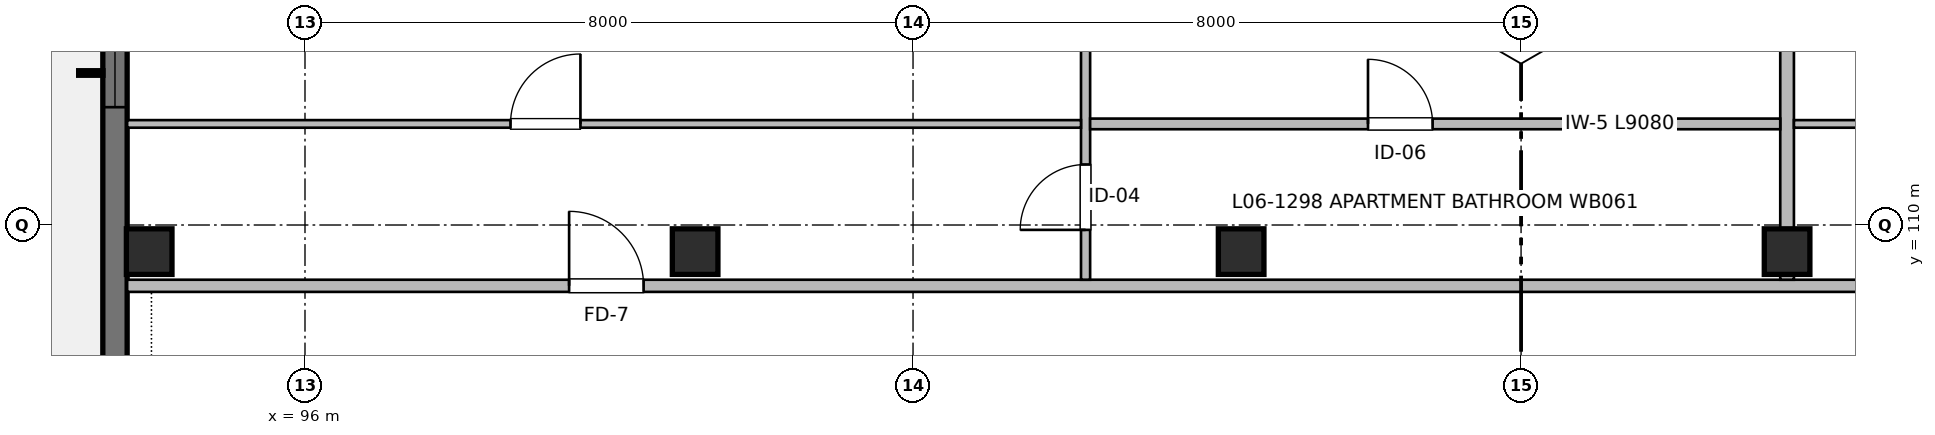
"""IFC4 building model, lengths in metres.
Left out: names, types, materials, properties, quantities, classifications, styles, units other than length and angle.
Written with IfcOpenShell. Run it as: python <this file> out.ifc"""

import sys

from ifc_helpers import new_model, si_unit, direction, frame, frame_2d, origin, origin_2d, place, context, subcontext, project, spatial, rectangle, extrude, element, fill, save


model = new_model("IFC4")
c1 = context("Model", 3, precision=1e-05, world=origin(), true_north=direction((0.0, 1.0)))
c2 = subcontext(c1, "Body", "Model", "MODEL_VIEW")
j1 = project(units=[si_unit("LENGTHUNIT", "METRE"), si_unit("PLANEANGLEUNIT", "RADIAN")], contexts=[c1])
p1 = place(None, origin())
s1 = spatial("IfcSite", under=j1, at=p1, CompositionType="ELEMENT")
p2 = place(p1, origin())
s2 = spatial("IfcBuilding", under=s1, at=p2, CompositionType="ELEMENT")
p3 = place(p2, frame((0.0, 0.0, 20.16)))
s3 = spatial("IfcBuildingStorey", under=s2, at=p3, CompositionType="ELEMENT", Elevation=20.16)
for number, where, z_axis, x_axis in (
    (1, (93.95, 109.65, 0.0), (0.0, 0.0, 1.0), (1.0, 0.0, 0.0)),
    (2, (101.133, 109.65, 0.0), (0.0, 0.0, 1.0), (1.0, 0.0, 0.0)),
    (3, (108.317, 109.65, 0.0), (0.0, 0.0, 1.0), (1.0, 0.0, 0.0)),
    (4, (115.5, 109.65, 0.0), (0.0, 0.0, 1.0), (1.0, 0.0, 0.0)),
):
    element("IfcColumn", number, at=place(p3, frame(where, z_axis=z_axis, x_axis=x_axis)), inside=s3, PredefinedType="COLUMN", context=c2, shape_type="SweptSolid", body=[
        extrude(rectangle(XDim=0.6, YDim=0.6, at=origin_2d()), origin(), (0.0, 0.0, 1.0), 3.2),
    ])
p4 = place(p3, frame((93.5, 100.0, 0.0), z_axis=(0.0, 0.0, 1.0), x_axis=(0.0, 1.0, 0.0)))
e5 = element("IfcWall", 5, at=p4, inside=s3, PredefinedType="SHEAR", context=c2, shape_type="SweptSolid", body=[
    extrude(rectangle(XDim=16.0, YDim=0.32, at=frame_2d((8.0, 0.0))), origin(), (0.0, 0.0, 1.0), 2.98),
])
p5 = place(p4, frame((3.4, 0.0, 0.0)))
e6 = element("IfcOpeningElement", 6, at=p5, cuts=e5, PredefinedType="OPENING", context=c2, shape_type="SweptSolid", body=[
    extrude(rectangle(XDim=1.2, YDim=2.2, at=frame_2d((0.6, 1.1))), frame((0.0, 0.17, 0.0), z_axis=(0.0, -1.0, 0.0), x_axis=(1.0, 0.0, 0.0)), (0.0, 0.0, 1.0), 0.34),
])
p6 = place(p4, frame((5.3, 0.0, 0.82)))
e7 = element("IfcOpeningElement", 7, at=p6, cuts=e5, PredefinedType="OPENING", context=c2, shape_type="SweptSolid", body=[
    extrude(rectangle(XDim=1.3, YDim=1.4, at=frame_2d((0.65, 0.7))), frame((0.0, 0.17, 0.0), z_axis=(0.0, -1.0, 0.0), x_axis=(1.0, 0.0, 0.0)), (0.0, 0.0, 1.0), 0.34),
])
p7 = place(p4, frame((11.55, 0.0, 0.72)))
e8 = element("IfcOpeningElement", 8, at=p7, cuts=e5, PredefinedType="OPENING", context=c2, shape_type="SweptSolid", body=[
    extrude(rectangle(XDim=1.8, YDim=1.5, at=frame_2d((0.9, 0.75))), frame((0.0, 0.17, 0.0), z_axis=(0.0, -1.0, 0.0), x_axis=(1.0, 0.0, 0.0)), (0.0, 0.0, 1.0), 0.34),
])
p8 = place(p3, frame((93.66, 109.2, 0.0), z_axis=(0.0, 0.0, 1.0), x_axis=(1.0, 0.0, 0.0)))
e9 = element("IfcWall", 9, at=p8, inside=s3, PredefinedType="PARTITIONING", context=c2, shape_type="SweptSolid", body=[
    extrude(rectangle(XDim=43.68, YDim=0.16, at=frame_2d((21.84, 0.0))), origin(), (0.0, 0.0, 1.0), 2.935),
])
p9 = place(p8, frame((5.815, 0.0, 0.0)))
e10 = element("IfcOpeningElement", 10, at=p9, cuts=e9, PredefinedType="OPENING", context=c2, shape_type="SweptSolid", body=[
    extrude(rectangle(XDim=0.98, YDim=2.15, at=frame_2d((0.49, 1.075))), frame((0.0, 0.09, 0.0), z_axis=(0.0, -1.0, 0.0), x_axis=(1.0, 0.0, 0.0)), (0.0, 0.0, 1.0), 0.18),
])
p10 = place(p8, frame((27.35, 0.0, 0.0)))
e11 = element("IfcOpeningElement", 11, at=p10, cuts=e9, PredefinedType="OPENING", context=c2, shape_type="SweptSolid", body=[
    extrude(rectangle(XDim=0.98, YDim=2.15, at=frame_2d((0.49, 1.075))), frame((0.0, 0.09, 0.0), z_axis=(0.0, -1.0, 0.0), x_axis=(1.0, 0.0, 0.0)), (0.0, 0.0, 1.0), 0.18),
])
p11 = place(p3, frame((115.5, 109.28, 0.0), z_axis=(0.0, 0.0, 1.0), x_axis=(0.0, 1.0, 0.0)))
e12 = element("IfcWall", 12, at=p11, inside=s3, PredefinedType="PARTITIONING", context=c2, shape_type="SweptSolid", body=[
    extrude(rectangle(XDim=6.59, YDim=0.18, at=frame_2d((3.295, 0.0))), origin(), (0.0, 0.0, 1.0), 2.68),
])
p12 = place(p3, frame((106.27, 109.28, 0.0), z_axis=(0.0, 0.0, 1.0), x_axis=(0.0, 1.0, 0.0)))
e13 = element("IfcWall", 13, at=p12, inside=s3, PredefinedType="PARTITIONING", context=c2, shape_type="SweptSolid", body=[
    extrude(rectangle(XDim=6.59, YDim=0.12, at=frame_2d((3.295, 0.0))), origin(), (0.0, 0.0, 1.0), 2.935),
])
p13 = place(p12, frame((0.656, 0.0, 0.0)))
e14 = element("IfcOpeningElement", 14, at=p13, cuts=e13, PredefinedType="OPENING", context=c2, shape_type="SweptSolid", body=[
    extrude(rectangle(XDim=0.86, YDim=2.1, at=frame_2d((0.43, 1.05))), frame((0.0, 0.07, 0.0), z_axis=(0.0, -1.0, 0.0), x_axis=(1.0, 0.0, 0.0)), (0.0, 0.0, 1.0), 0.14),
])
p14 = place(p12, frame((4.093, 0.0, 0.0)))
e15 = element("IfcOpeningElement", 15, at=p14, cuts=e13, PredefinedType="OPENING", context=c2, shape_type="SweptSolid", body=[
    extrude(rectangle(XDim=0.9, YDim=2.1, at=frame_2d((0.45, 1.05))), frame((0.0, 0.07, 0.0), z_axis=(0.0, -1.0, 0.0), x_axis=(1.0, 0.0, 0.0)), (0.0, 0.0, 1.0), 0.14),
])
p15 = place(p3, frame((106.33, 111.33, 0.0), z_axis=(0.0, 0.0, 1.0), x_axis=(1.0, 0.0, 0.0)))
e16 = element("IfcWall", 16, at=p15, inside=s3, PredefinedType="PARTITIONING", context=c2, shape_type="SweptSolid", body=[
    extrude(rectangle(XDim=9.08, YDim=0.14, at=frame_2d((4.54, 0.0))), origin(), (0.0, 0.0, 1.0), 2.935),
])
p16 = place(p15, frame((3.656, 0.0, 0.0)))
e17 = element("IfcOpeningElement", 17, at=p16, cuts=e16, PredefinedType="OPENING", context=c2, shape_type="SweptSolid", body=[
    extrude(rectangle(XDim=0.85, YDim=2.05, at=frame_2d((0.425, 1.025))), frame((0.0, 0.08, 0.0), z_axis=(0.0, -1.0, 0.0), x_axis=(1.0, 0.0, 0.0)), (0.0, 0.0, 1.0), 0.16),
])
p17 = place(p3, frame((93.66, 111.33, 0.0), z_axis=(0.0, 0.0, 1.0), x_axis=(1.0, 0.0, 0.0)))
e18 = element("IfcWall", 18, at=p17, inside=s3, PredefinedType="PARTITIONING", context=c2, shape_type="SweptSolid", body=[
    extrude(rectangle(XDim=12.55, YDim=0.1, at=frame_2d((6.275, 0.0))), origin(), (0.0, 0.0, 1.0), 2.935),
])
p18 = place(p17, frame((5.044, 0.0, 0.0)))
e19 = element("IfcOpeningElement", 19, at=p18, cuts=e18, PredefinedType="OPENING", context=c2, shape_type="SweptSolid", body=[
    extrude(rectangle(XDim=0.92, YDim=2.1, at=frame_2d((0.46, 1.05))), frame((0.0, 0.06, 0.0), z_axis=(0.0, -1.0, 0.0), x_axis=(1.0, 0.0, 0.0)), (0.0, 0.0, 1.0), 0.12),
])
p19 = place(p3, frame((115.59, 111.33, 0.0), z_axis=(0.0, 0.0, 1.0), x_axis=(1.0, 0.0, 0.0)))
e20 = element("IfcWall", 20, at=p19, inside=s3, PredefinedType="PARTITIONING", context=c2, shape_type="SweptSolid", body=[
    extrude(rectangle(XDim=12.56, YDim=0.1, at=frame_2d((6.28, 0.0))), origin(), (0.0, 0.0, 1.0), 2.935),
])
p20 = place(p19, frame((5.048, 0.0, 0.0)))
e21 = element("IfcOpeningElement", 21, at=p20, cuts=e20, PredefinedType="OPENING", context=c2, shape_type="SweptSolid", body=[
    extrude(rectangle(XDim=0.92, YDim=2.1, at=frame_2d((0.46, 1.05))), frame((0.0, 0.06, 0.0), z_axis=(0.0, -1.0, 0.0), x_axis=(1.0, 0.0, 0.0)), (0.0, 0.0, 1.0), 0.12),
])
p21 = place(p7, origin())
e22 = element("IfcWindow", 22, at=p21, inside=s3, PartitioningType="SINGLE_PANEL", PredefinedType="WINDOW", context=c2, shape_type="SweptSolid", body=[
    extrude(rectangle(XDim=1.8, YDim=1.5, at=frame_2d((0.9, 0.75))), frame((0.0, 0.03, 0.0), z_axis=(0.0, -1.0, 0.0), x_axis=(1.0, 0.0, 0.0)), (0.0, 0.0, 1.0), 0.06),
])
fill(e8, e22)
p22 = place(p9, origin())
e23 = element("IfcDoor", 23, at=p22, inside=s3, OperationType="SINGLE_SWING_LEFT", PredefinedType="DOOR", context=c2, shape_type="SweptSolid", body=[
    extrude(rectangle(XDim=0.98, YDim=2.15, at=frame_2d((0.49, 1.075))), frame((0.0, 0.025, 0.0), z_axis=(0.0, -1.0, 0.0), x_axis=(1.0, 0.0, 0.0)), (0.0, 0.0, 1.0), 0.05),
])
fill(e10, e23)
p23 = place(p18, origin())
e24 = element("IfcDoor", 24, at=p23, inside=s3, OperationType="SINGLE_SWING_RIGHT", PredefinedType="DOOR", context=c2, shape_type="SweptSolid", body=[
    extrude(rectangle(XDim=0.92, YDim=2.1, at=frame_2d((0.46, 1.05))), frame((0.0, 0.025, 0.0), z_axis=(0.0, -1.0, 0.0), x_axis=(1.0, 0.0, 0.0)), (0.0, 0.0, 1.0), 0.05),
])
fill(e19, e24)
p24 = place(p13, origin())
e25 = element("IfcDoor", 25, at=p24, inside=s3, OperationType="SINGLE_SWING_LEFT", PredefinedType="DOOR", context=c2, shape_type="SweptSolid", body=[
    extrude(rectangle(XDim=0.86, YDim=2.1, at=frame_2d((0.43, 1.05))), frame((0.0, 0.025, 0.0), z_axis=(0.0, -1.0, 0.0), x_axis=(1.0, 0.0, 0.0)), (0.0, 0.0, 1.0), 0.05),
])
fill(e14, e25)
p25 = place(p16, origin())
e26 = element("IfcDoor", 26, at=p25, inside=s3, OperationType="SINGLE_SWING_LEFT", PredefinedType="DOOR", context=c2, shape_type="SweptSolid", body=[
    extrude(rectangle(XDim=0.85, YDim=2.05, at=frame_2d((0.425, 1.025))), frame((0.0, 0.025, 0.0), z_axis=(0.0, -1.0, 0.0), x_axis=(1.0, 0.0, 0.0)), (0.0, 0.0, 1.0), 0.05),
])
fill(e17, e26)
save(model, sys.argv[1])
